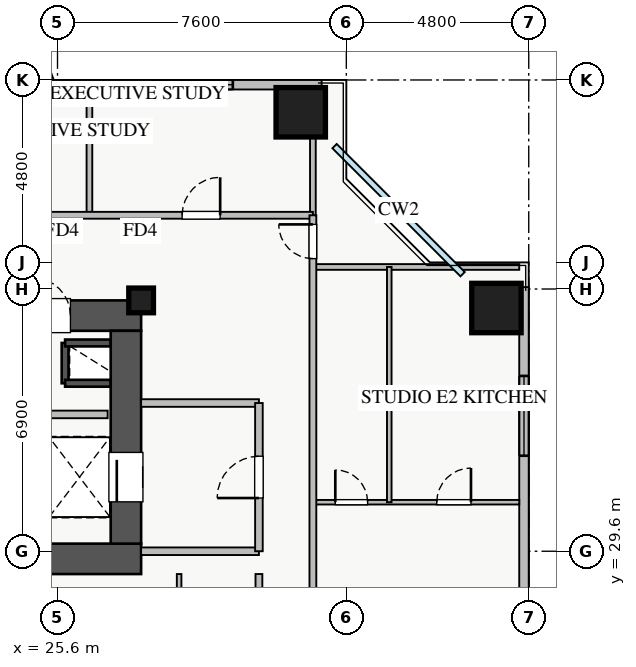
"""IFC4 building model, lengths in metres.
Left out: names, types, materials, properties, quantities, classifications, styles, units other than length and angle.
Written with IfcOpenShell. Run it as: python <this file> out.ifc"""

import sys

from ifc_helpers import new_model, si_unit, direction, frame, frame_2d, origin, origin_2d, place, context, subcontext, project, spatial, rectangle, extrude, source, transform, mapped, element, fill, save


model = new_model("IFC4")
c1 = context("Model", 3, precision=1e-05, world=origin(), true_north=direction((0.0, 1.0)))
c2 = subcontext(c1, "Body", "Model", "MODEL_VIEW")
j1 = project(units=[si_unit("LENGTHUNIT", "METRE"), si_unit("PLANEANGLEUNIT", "RADIAN")], contexts=[c1])
p1 = place(None, origin())
s1 = spatial("IfcSite", under=j1, at=p1, CompositionType="ELEMENT")
p2 = place(p1, origin())
s2 = spatial("IfcBuilding", under=s1, at=p2, CompositionType="ELEMENT")
p3 = place(p2, frame((0.0, 0.0, 73.0)))
s3 = spatial("IfcBuildingStorey", under=s2, at=p3, CompositionType="ELEMENT", Elevation=73.0)
p4 = place(p3, frame((25.8, 34.02, 0.0), z_axis=(0.0, 0.0, 1.0), x_axis=(0.0, 1.0, 0.0)))
e1 = element("IfcWall", 1, at=p4, inside=s3, PredefinedType="SHEAR", context=c2, shape_type="SweptSolid", body=[
    extrude(rectangle(XDim=1.06, YDim=0.18, at=frame_2d((0.53, 0.0))), origin(), (0.0, 0.0, 1.0), 3.07),
])
for number, where, z_axis, x_axis in (
    (2, (25.8, 35.08, 0.0), (0.0, 0.0, 1.0), (1.0, 0.0, 0.0)),
    (3, (25.8, 34.02, 0.0), (0.0, 0.0, 1.0), (1.0, 0.0, 0.0)),
):
    element("IfcWall", number, at=place(p3, frame(where, z_axis=z_axis, x_axis=x_axis)), inside=s3, PredefinedType="SHEAR", context=c2, shape_type="SweptSolid", body=[
        extrude(rectangle(XDim=1.2, YDim=0.18, at=frame_2d((0.6, 0.0))), origin(), (0.0, 0.0, 1.0), 3.07),
    ])
p5 = place(p3, frame((10.2, 29.4, 0.0), z_axis=(0.0, 0.0, 1.0), x_axis=(1.0, 0.0, 0.0)))
e4 = element("IfcWall", 4, at=p5, inside=s3, PredefinedType="SHEAR", context=c2, shape_type="SweptSolid", body=[
    extrude(rectangle(XDim=17.6, YDim=0.8, at=frame_2d((8.8, 0.0))), origin(), (0.0, 0.0, 1.0), 3.25),
])
p6 = place(p3, frame((10.2, 35.8, 0.0), z_axis=(0.0, 0.0, 1.0), x_axis=(1.0, 0.0, 0.0)))
e5 = element("IfcWall", 5, at=p6, inside=s3, PredefinedType="SHEAR", context=c2, shape_type="SweptSolid", body=[
    extrude(rectangle(XDim=17.6, YDim=0.8, at=frame_2d((8.8, 0.0))), origin(), (0.0, 0.0, 1.0), 3.25),
])
p7 = place(p6, frame((1.15, 0.0, 0.0)))
e6 = element("IfcOpeningElement", 6, at=p7, cuts=e5, PredefinedType="OPENING", context=c2, shape_type="SweptSolid", body=[
    extrude(rectangle(XDim=1.1, YDim=2.05, at=frame_2d((0.55, 1.025))), frame((0.0, 0.41, 0.0), z_axis=(0.0, -1.0, 0.0), x_axis=(1.0, 0.0, 0.0)), (0.0, 0.0, 1.0), 0.82),
])
p8 = place(p6, frame((8.3, 0.0, 0.0)))
e7 = element("IfcOpeningElement", 7, at=p8, cuts=e5, PredefinedType="OPENING", context=c2, shape_type="SweptSolid", body=[
    extrude(rectangle(XDim=1.1, YDim=2.05, at=frame_2d((0.55, 1.025))), frame((0.0, 0.41, 0.0), z_axis=(0.0, -1.0, 0.0), x_axis=(1.0, 0.0, 0.0)), (0.0, 0.0, 1.0), 0.82),
])
p9 = place(p6, frame((10.05, 0.0, 0.0)))
e8 = element("IfcOpeningElement", 8, at=p9, cuts=e5, PredefinedType="OPENING", context=c2, shape_type="SweptSolid", body=[
    extrude(rectangle(XDim=1.1, YDim=2.05, at=frame_2d((0.55, 1.025))), frame((0.0, 0.41, 0.0), z_axis=(0.0, -1.0, 0.0), x_axis=(1.0, 0.0, 0.0)), (0.0, 0.0, 1.0), 0.82),
])
p10 = place(p6, frame((14.74, 0.0, 0.0)))
e9 = element("IfcOpeningElement", 9, at=p10, cuts=e5, PredefinedType="OPENING", context=c2, shape_type="SweptSolid", body=[
    extrude(rectangle(XDim=1.0, YDim=2.05, at=frame_2d((0.5, 1.025))), frame((0.0, 0.41, 0.0), z_axis=(0.0, -1.0, 0.0), x_axis=(1.0, 0.0, 0.0)), (0.0, 0.0, 1.0), 0.82),
])
p11 = place(p6, frame((11.95, 0.0, 0.0)))
e10 = element("IfcOpeningElement", 10, at=p11, cuts=e5, PredefinedType="OPENING", context=c2, shape_type="SweptSolid", body=[
    extrude(rectangle(XDim=1.0, YDim=2.05, at=frame_2d((0.5, 1.025))), frame((0.0, 0.41, 0.0), z_axis=(0.0, -1.0, 0.0), x_axis=(1.0, 0.0, 0.0)), (0.0, 0.0, 1.0), 0.82),
])
p12 = place(p6, frame((13.485, 0.0, 0.0)))
e11 = element("IfcOpeningElement", 11, at=p12, cuts=e5, PredefinedType="OPENING", context=c2, shape_type="SweptSolid", body=[
    extrude(rectangle(XDim=1.0, YDim=2.05, at=frame_2d((0.5, 1.025))), frame((0.0, 0.41, 0.0), z_axis=(0.0, -1.0, 0.0), x_axis=(1.0, 0.0, 0.0)), (0.0, 0.0, 1.0), 0.82),
])
p13 = place(p3, frame((27.4, 29.8, 0.0), z_axis=(0.0, 0.0, 1.0), x_axis=(0.0, 1.0, 0.0)))
e12 = element("IfcWall", 12, at=p13, inside=s3, PredefinedType="SHEAR", context=c2, shape_type="SweptSolid", body=[
    extrude(rectangle(XDim=5.6, YDim=0.8, at=frame_2d((2.8, 0.0))), origin(), (0.0, 0.0, 1.0), 3.25),
])
p14 = place(p13, frame((1.1, 0.0, 0.0)))
e13 = element("IfcOpeningElement", 13, at=p14, cuts=e12, PredefinedType="OPENING", context=c2, shape_type="SweptSolid", body=[
    extrude(rectangle(XDim=1.3, YDim=2.05, at=frame_2d((0.65, 1.025))), frame((0.0, 0.41, 0.0), z_axis=(0.0, -1.0, 0.0), x_axis=(1.0, 0.0, 0.0)), (0.0, 0.0, 1.0), 0.82),
])
m1 = source(origin(), c2, "Body", "SweptSolid", [
    extrude(rectangle(XDim=0.65, YDim=0.65, at=origin_2d()), origin(), (0.0, 0.0, 1.0), 3.25),
])
p15 = place(p3, frame((27.8, 36.2, 0.0), z_axis=(0.0, 0.0, 1.0), x_axis=(1.0, 0.0, 0.0)))
e14 = element("IfcColumn", 14, at=p15, inside=s3, PredefinedType="PILASTER", context=c2, shape_type="MappedRepresentation", body=[
    mapped(m1, transform((0.0, 0.0, 0.0), x_axis=(1.0, 0.0, 0.0), y_axis=(0.0, 1.0, 0.0), z_axis=(0.0, 0.0, 1.0), scale=1.0)),
])
m2 = source(origin(), c2, "Body", "SweptSolid", [
    extrude(rectangle(XDim=1.3, YDim=1.3, at=origin_2d()), origin(), (0.0, 0.0, 1.0), 3.25),
])
for number, where, z_axis, x_axis in (
    (15, (37.15, 36.0, 0.0), (0.0, 0.0, 1.0), (1.0, 0.0, 0.0)),
    (16, (32.0, 41.15, 0.0), (0.0, 0.0, 1.0), (1.0, 0.0, 0.0)),
):
    element("IfcColumn", number, at=place(p3, frame(where, z_axis=z_axis, x_axis=x_axis)), inside=s3, PredefinedType="COLUMN", context=c2, shape_type="MappedRepresentation", body=[
        mapped(m2, transform((0.0, 0.0, 0.0), x_axis=(1.0, 0.0, 0.0), y_axis=(0.0, 1.0, 0.0), z_axis=(0.0, 0.0, 1.0), scale=1.0)),
    ])
p16 = place(p3, frame((5.45, 41.875, 0.0), z_axis=(0.0, 0.0, 1.0), x_axis=(1.0, 0.0, 0.0)))
e17 = element("IfcWall", 17, at=p16, inside=s3, PredefinedType="STANDARD", context=c2, shape_type="SweptSolid", body=[
    extrude(rectangle(XDim=27.1, YDim=0.25, at=frame_2d((13.55, 0.0))), origin(), (0.0, 0.0, 1.0), 2.61),
])
p17 = place(p16, frame((14.4, 0.0, 0.0)))
e18 = element("IfcOpeningElement", 18, at=p17, cuts=e17, PredefinedType="OPENING", context=c2, shape_type="SweptSolid", body=[
    extrude(rectangle(XDim=1.2, YDim=2.1, at=frame_2d((0.6, 1.05))), frame((0.0, 0.135, 0.0), z_axis=(0.0, -1.0, 0.0), x_axis=(1.0, 0.0, 0.0)), (0.0, 0.0, 1.0), 0.27),
])
p18 = place(p16, frame((1.48, 0.0, 0.9)))
e19 = element("IfcOpeningElement", 19, at=p18, cuts=e17, PredefinedType="OPENING", context=c2, shape_type="SweptSolid", body=[
    extrude(rectangle(XDim=1.5, YDim=1.5, at=frame_2d((0.75, 0.75))), frame((0.0, 0.135, 0.0), z_axis=(0.0, -1.0, 0.0), x_axis=(1.0, 0.0, 0.0)), (0.0, 0.0, 1.0), 0.27),
])
p19 = place(p16, frame((7.725, 0.0, 0.9)))
e20 = element("IfcOpeningElement", 20, at=p19, cuts=e17, PredefinedType="OPENING", context=c2, shape_type="SweptSolid", body=[
    extrude(rectangle(XDim=1.8, YDim=1.5, at=frame_2d((0.9, 0.75))), frame((0.0, 0.135, 0.0), z_axis=(0.0, -1.0, 0.0), x_axis=(1.0, 0.0, 0.0)), (0.0, 0.0, 1.0), 0.27),
])
p20 = place(p16, frame((17.92, 0.0, 0.9)))
e21 = element("IfcOpeningElement", 21, at=p20, cuts=e17, PredefinedType="OPENING", context=c2, shape_type="SweptSolid", body=[
    extrude(rectangle(XDim=1.5, YDim=1.5, at=frame_2d((0.75, 0.75))), frame((0.0, 0.135, 0.0), z_axis=(0.0, -1.0, 0.0), x_axis=(1.0, 0.0, 0.0)), (0.0, 0.0, 1.0), 0.27),
])
p21 = place(p16, frame((22.663, 0.0, 0.9)))
e22 = element("IfcOpeningElement", 22, at=p21, cuts=e17, PredefinedType="OPENING", context=c2, shape_type="SweptSolid", body=[
    extrude(rectangle(XDim=2.1, YDim=1.48, at=frame_2d((1.05, 0.74))), frame((0.0, 0.135, 0.0), z_axis=(0.0, -1.0, 0.0), x_axis=(1.0, 0.0, 0.0)), (0.0, 0.0, 1.0), 0.27),
])
p22 = place(p16, frame((5.114, 0.0, 0.9)))
e23 = element("IfcOpeningElement", 23, at=p22, cuts=e17, PredefinedType="OPENING", context=c2, shape_type="SweptSolid", body=[
    extrude(rectangle(XDim=2.4, YDim=1.5, at=frame_2d((1.2, 0.75))), frame((0.0, 0.135, 0.0), z_axis=(0.0, -1.0, 0.0), x_axis=(1.0, 0.0, 0.0)), (0.0, 0.0, 1.0), 0.27),
])
p23 = place(p16, frame((10.893, 0.0, 0.9)))
e24 = element("IfcOpeningElement", 24, at=p23, cuts=e17, PredefinedType="OPENING", context=c2, shape_type="SweptSolid", body=[
    extrude(rectangle(XDim=2.4, YDim=1.5, at=frame_2d((1.2, 0.75))), frame((0.0, 0.135, 0.0), z_axis=(0.0, -1.0, 0.0), x_axis=(1.0, 0.0, 0.0)), (0.0, 0.0, 1.0), 0.27),
])
p24 = place(p3, frame((37.875, 9.45, 0.0), z_axis=(0.0, 0.0, 1.0), x_axis=(0.0, 1.0, 0.0)))
e25 = element("IfcWall", 25, at=p24, inside=s3, PredefinedType="STANDARD", context=c2, shape_type="SweptSolid", body=[
    extrude(rectangle(XDim=27.1, YDim=0.25, at=frame_2d((13.55, 0.0))), origin(), (0.0, 0.0, 1.0), 2.61),
])
p25 = place(p24, frame((14.4, 0.0, 0.0)))
e26 = element("IfcOpeningElement", 26, at=p25, cuts=e25, PredefinedType="OPENING", context=c2, shape_type="SweptSolid", body=[
    extrude(rectangle(XDim=1.2, YDim=2.1, at=frame_2d((0.6, 1.05))), frame((0.0, 0.135, 0.0), z_axis=(0.0, -1.0, 0.0), x_axis=(1.0, 0.0, 0.0)), (0.0, 0.0, 1.0), 0.27),
])
p26 = place(p24, frame((2.188, 0.0, 0.9)))
e27 = element("IfcOpeningElement", 27, at=p26, cuts=e25, PredefinedType="OPENING", context=c2, shape_type="SweptSolid", body=[
    extrude(rectangle(XDim=2.4, YDim=1.48, at=frame_2d((1.2, 0.74))), frame((0.0, 0.135, 0.0), z_axis=(0.0, -1.0, 0.0), x_axis=(1.0, 0.0, 0.0)), (0.0, 0.0, 1.0), 0.27),
])
p27 = place(p24, frame((22.663, 0.0, 0.9)))
e28 = element("IfcOpeningElement", 28, at=p27, cuts=e25, PredefinedType="OPENING", context=c2, shape_type="SweptSolid", body=[
    extrude(rectangle(XDim=2.1, YDim=1.48, at=frame_2d((1.05, 0.74))), frame((0.0, 0.135, 0.0), z_axis=(0.0, -1.0, 0.0), x_axis=(1.0, 0.0, 0.0)), (0.0, 0.0, 1.0), 0.27),
])
p28 = place(p24, frame((17.365, 0.0, 0.9)))
e29 = element("IfcOpeningElement", 29, at=p28, cuts=e25, PredefinedType="OPENING", context=c2, shape_type="SweptSolid", body=[
    extrude(rectangle(XDim=0.9, YDim=1.2, at=frame_2d((0.45, 0.6))), frame((0.0, 0.135, 0.0), z_axis=(0.0, -1.0, 0.0), x_axis=(1.0, 0.0, 0.0)), (0.0, 0.0, 1.0), 0.27),
])
for number, where, z_axis, x_axis in (
    (30, (27.8, 29.6, 0.0), (0.0, 0.0, 1.0), (1.0, 0.0, 0.0)),
    (31, (27.8, 33.5, 0.0), (0.0, 0.0, 1.0), (1.0, 0.0, 0.0)),
):
    element("IfcWall", number, at=place(p3, frame(where, z_axis=z_axis, x_axis=x_axis)), inside=s3, PredefinedType="PARTITIONING", context=c2, shape_type="SweptSolid", body=[
        extrude(rectangle(XDim=3.1, YDim=0.2, at=frame_2d((1.55, 0.0))), origin(), (0.0, 0.0, 1.0), 3.07),
    ])
p29 = place(p3, frame((30.9, 29.6, 0.0), z_axis=(0.0, 0.0, 1.0), x_axis=(0.0, 1.0, 0.0)))
e32 = element("IfcWall", 32, at=p29, inside=s3, PredefinedType="PARTITIONING", context=c2, shape_type="SweptSolid", body=[
    extrude(rectangle(XDim=3.9, YDim=0.2, at=frame_2d((1.95, 0.0))), origin(), (0.0, 0.0, 1.0), 3.07),
])
p30 = place(p29, frame((1.4, 0.0, 0.0)))
e33 = element("IfcOpeningElement", 33, at=p30, cuts=e32, PredefinedType="OPENING", context=c2, shape_type="SweptSolid", body=[
    extrude(rectangle(XDim=1.1, YDim=2.05, at=frame_2d((0.55, 1.025))), frame((0.0, 0.11, 0.0), z_axis=(0.0, -1.0, 0.0), x_axis=(1.0, 0.0, 0.0)), (0.0, 0.0, 1.0), 0.22),
])
p31 = place(p3, frame((21.75, 33.2, 0.0), z_axis=(0.0, 0.0, 1.0), x_axis=(1.0, 0.0, 0.0)))
e34 = element("IfcWall", 34, at=p31, inside=s3, PredefinedType="PARTITIONING", context=c2, shape_type="SweptSolid", body=[
    extrude(rectangle(XDim=5.17, YDim=0.2, at=frame_2d((2.585, 0.0))), origin(), (0.0, 0.0, 1.0), 3.07),
])
for number, where, z_axis, x_axis in (
    (35, (26.44, 38.44, 0.0), (0.0, 0.0, 1.0), (0.0, 1.0, 0.0)),
    (36, (32.32, 38.44, 0.0), (0.0, 0.0, 1.0), (0.0, 1.0, 0.0)),
):
    element("IfcWall", number, at=place(p3, frame(where, z_axis=z_axis, x_axis=x_axis)), inside=s3, PredefinedType="PARTITIONING", context=c2, shape_type="SweptSolid", body=[
        extrude(rectangle(XDim=3.31, YDim=0.15, at=frame_2d((1.655, 0.0))), origin(), (0.0, 0.0, 1.0), 3.07),
    ])
p32 = place(p3, frame((8.78, 38.44, 0.0), z_axis=(0.0, 0.0, 1.0), x_axis=(1.0, 0.0, 0.0)))
e37 = element("IfcWall", 37, at=p32, inside=s3, PredefinedType="PARTITIONING", context=c2, shape_type="SweptSolid", body=[
    extrude(rectangle(XDim=23.54, YDim=0.18, at=frame_2d((11.77, 0.0))), origin(), (0.0, 0.0, 1.0), 3.07),
])
p33 = place(p32, frame((2.72, 0.0, 0.0)))
e38 = element("IfcOpeningElement", 38, at=p33, cuts=e37, PredefinedType="OPENING", context=c2, shape_type="SweptSolid", body=[
    extrude(rectangle(XDim=1.0, YDim=2.05, at=frame_2d((0.5, 1.025))), frame((0.0, 0.1, 0.0), z_axis=(0.0, -1.0, 0.0), x_axis=(1.0, 0.0, 0.0)), (0.0, 0.0, 1.0), 0.2),
])
p34 = place(p32, frame((9.23, 0.0, 0.0)))
e39 = element("IfcOpeningElement", 39, at=p34, cuts=e37, PredefinedType="OPENING", context=c2, shape_type="SweptSolid", body=[
    extrude(rectangle(XDim=1.0, YDim=2.05, at=frame_2d((0.5, 1.025))), frame((0.0, 0.1, 0.0), z_axis=(0.0, -1.0, 0.0), x_axis=(1.0, 0.0, 0.0)), (0.0, 0.0, 1.0), 0.2),
])
p35 = place(p32, frame((14.84, 0.0, 0.0)))
e40 = element("IfcOpeningElement", 40, at=p35, cuts=e37, PredefinedType="OPENING", context=c2, shape_type="SweptSolid", body=[
    extrude(rectangle(XDim=1.0, YDim=2.05, at=frame_2d((0.5, 1.025))), frame((0.0, 0.1, 0.0), z_axis=(0.0, -1.0, 0.0), x_axis=(1.0, 0.0, 0.0)), (0.0, 0.0, 1.0), 0.2),
])
p36 = place(p32, frame((20.1, 0.0, 0.0)))
e41 = element("IfcOpeningElement", 41, at=p36, cuts=e37, PredefinedType="OPENING", context=c2, shape_type="SweptSolid", body=[
    extrude(rectangle(XDim=1.0, YDim=2.05, at=frame_2d((0.5, 1.025))), frame((0.0, 0.1, 0.0), z_axis=(0.0, -1.0, 0.0), x_axis=(1.0, 0.0, 0.0)), (0.0, 0.0, 1.0), 0.2),
])
p37 = place(p3, frame((32.32, 37.08, 0.0), z_axis=(0.0, 0.0, 1.0), x_axis=(1.0, 0.0, 0.0)))
e42 = element("IfcWall", 42, at=p37, inside=s3, PredefinedType="PARTITIONING", context=c2, shape_type="SweptSolid", body=[
    extrude(rectangle(XDim=5.43, YDim=0.15, at=frame_2d((2.715, 0.0))), origin(), (0.0, 0.0, 1.0), 3.07),
])
p38 = place(p3, frame((32.32, 30.89, 0.0), z_axis=(0.0, 0.0, 1.0), x_axis=(1.0, 0.0, 0.0)))
e43 = element("IfcWall", 43, at=p38, inside=s3, PredefinedType="PLUMBINGWALL", context=c2, shape_type="SweptSolid", body=[
    extrude(rectangle(XDim=5.43, YDim=0.12, at=frame_2d((2.715, 0.0))), origin(), (0.0, 0.0, 1.0), 3.07),
])
p39 = place(p38, frame((0.59, 0.0, 0.0)))
e44 = element("IfcOpeningElement", 44, at=p39, cuts=e43, PredefinedType="OPENING", context=c2, shape_type="SweptSolid", body=[
    extrude(rectangle(XDim=0.85, YDim=2.05, at=frame_2d((0.425, 1.025))), frame((0.0, 0.07, 0.0), z_axis=(0.0, -1.0, 0.0), x_axis=(1.0, 0.0, 0.0)), (0.0, 0.0, 1.0), 0.14),
])
p40 = place(p38, frame((3.26, 0.0, 0.0)))
e45 = element("IfcOpeningElement", 45, at=p40, cuts=e43, PredefinedType="OPENING", context=c2, shape_type="SweptSolid", body=[
    extrude(rectangle(XDim=0.9, YDim=2.05, at=frame_2d((0.45, 1.025))), frame((0.0, 0.07, 0.0), z_axis=(0.0, -1.0, 0.0), x_axis=(1.0, 0.0, 0.0)), (0.0, 0.0, 1.0), 0.14),
])
p41 = place(p3, frame((34.33, 30.89, 0.0), z_axis=(0.0, 0.0, 1.0), x_axis=(0.0, 1.0, 0.0)))
e46 = element("IfcWall", 46, at=p41, inside=s3, PredefinedType="PLUMBINGWALL", context=c2, shape_type="SweptSolid", body=[
    extrude(rectangle(XDim=6.19, YDim=0.12, at=frame_2d((3.095, 0.0))), origin(), (0.0, 0.0, 1.0), 3.07),
])
p42 = place(p3, frame((32.32, 7.21, 0.0), z_axis=(0.0, 0.0, 1.0), x_axis=(0.0, 1.0, 0.0)))
e47 = element("IfcWall", 47, at=p42, inside=s3, PredefinedType="PARTITIONING", context=c2, shape_type="SweptSolid", body=[
    extrude(rectangle(XDim=31.23, YDim=0.18, at=frame_2d((15.615, 0.0))), origin(), (0.0, 0.0, 1.0), 2.771),
])
p43 = place(p42, frame((30.09, 0.0, 0.0)))
e48 = element("IfcOpeningElement", 48, at=p43, cuts=e47, PredefinedType="OPENING", context=c2, shape_type="SweptSolid", body=[
    extrude(rectangle(XDim=0.9, YDim=2.05, at=frame_2d((0.45, 1.025))), frame((0.0, 0.1, 0.0), z_axis=(0.0, -1.0, 0.0), x_axis=(1.0, 0.0, 0.0)), (0.0, 0.0, 1.0), 0.2),
])
p44 = place(p42, frame((0.415, 0.0, 0.0)))
e49 = element("IfcOpeningElement", 49, at=p44, cuts=e47, PredefinedType="OPENING", context=c2, shape_type="SweptSolid", body=[
    extrude(rectangle(XDim=0.9, YDim=2.05, at=frame_2d((0.45, 1.025))), frame((0.0, 0.1, 0.0), z_axis=(0.0, -1.0, 0.0), x_axis=(1.0, 0.0, 0.0)), (0.0, 0.0, 1.0), 0.2),
])
p45 = place(p42, frame((4.99, 0.0, 0.0)))
e50 = element("IfcOpeningElement", 50, at=p45, cuts=e47, PredefinedType="OPENING", context=c2, shape_type="SweptSolid", body=[
    extrude(rectangle(XDim=1.0, YDim=2.05, at=frame_2d((0.5, 1.025))), frame((0.0, 0.1, 0.0), z_axis=(0.0, -1.0, 0.0), x_axis=(1.0, 0.0, 0.0)), (0.0, 0.0, 1.0), 0.2),
])
p46 = place(p42, frame((19.355, 0.0, 0.0)))
e51 = element("IfcOpeningElement", 51, at=p46, cuts=e47, PredefinedType="OPENING", context=c2, shape_type="SweptSolid", body=[
    extrude(rectangle(XDim=1.0, YDim=2.05, at=frame_2d((0.5, 1.025))), frame((0.0, 0.1, 0.0), z_axis=(0.0, -1.0, 0.0), x_axis=(1.0, 0.0, 0.0)), (0.0, 0.0, 1.0), 0.2),
])
p47 = place(p3, frame((28.8, 23.1, 0.0), z_axis=(0.0, 0.0, 1.0), x_axis=(0.0, 1.0, 0.0)))
e52 = element("IfcWall", 52, at=p47, inside=s3, PredefinedType="PLUMBINGWALL", context=c2, shape_type="SweptSolid", body=[
    extrude(rectangle(XDim=5.9, YDim=0.12, at=frame_2d((2.95, 0.0))), origin(), (0.0, 0.0, 1.0), 3.07),
])
p48 = place(p3, frame((30.9, 17.0, 0.0), z_axis=(0.0, 0.0, 1.0), x_axis=(0.0, 1.0, 0.0)))
e53 = element("IfcWall", 53, at=p48, inside=s3, PredefinedType="PARTITIONING", context=c2, shape_type="SweptSolid", body=[
    extrude(rectangle(XDim=12.0, YDim=0.18, at=frame_2d((6.0, 0.0))), origin(), (0.0, 0.0, 1.0), 3.07),
])
p49 = place(p48, frame((2.36, 0.0, 0.0)))
e54 = element("IfcOpeningElement", 54, at=p49, cuts=e53, PredefinedType="OPENING", context=c2, shape_type="SweptSolid", body=[
    extrude(rectangle(XDim=1.0, YDim=2.05, at=frame_2d((0.5, 1.025))), frame((0.0, 0.1, 0.0), z_axis=(0.0, -1.0, 0.0), x_axis=(1.0, 0.0, 0.0)), (0.0, 0.0, 1.0), 0.2),
])
m3 = source(origin(), c2, "Body", "SweptSolid", [
    extrude(rectangle(XDim=2.1, YDim=1.48, at=frame_2d((1.05, 0.74))), frame((0.0, 0.03, 0.0), z_axis=(0.0, -1.0, 0.0), x_axis=(1.0, 0.0, 0.0)), (0.0, 0.0, 1.0), 0.06),
])
p50 = place(p21, origin())
e55 = element("IfcWindow", 55, at=p50, inside=s3, PartitioningType="TRIPLE_PANEL_VERTICAL", PredefinedType="WINDOW", context=c2, shape_type="MappedRepresentation", body=[
    mapped(m3, transform((0.0, 0.0, 0.0), x_axis=(1.0, 0.0, 0.0), y_axis=(0.0, 1.0, 0.0), z_axis=(0.0, 0.0, 1.0), scale=1.0)),
])
fill(e22, e55)
p51 = place(p27, origin())
e56 = element("IfcWindow", 56, at=p51, inside=s3, PartitioningType="TRIPLE_PANEL_VERTICAL", PredefinedType="WINDOW", context=c2, shape_type="MappedRepresentation", body=[
    mapped(m3, transform((0.0, 0.0, 0.0), x_axis=(1.0, 0.0, 0.0), y_axis=(0.0, 1.0, 0.0), z_axis=(0.0, 0.0, 1.0), scale=1.0)),
])
fill(e28, e56)
m4 = source(origin(), c2, "Body", "SweptSolid", [
    extrude(rectangle(XDim=1.3, YDim=2.05, at=frame_2d((0.65, 1.025))), frame((0.0, 0.025, 0.0), z_axis=(0.0, -1.0, 0.0), x_axis=(1.0, 0.0, 0.0)), (0.0, 0.0, 1.0), 0.05),
])
p52 = place(p14, origin())
e57 = element("IfcDoor", 57, at=p52, inside=s3, OperationType="SLIDING_TO_LEFT", PredefinedType="DOOR", context=c2, shape_type="MappedRepresentation", body=[
    mapped(m4, transform((0.0, 0.0, 0.0), x_axis=(1.0, 0.0, 0.0), y_axis=(0.0, 1.0, 0.0), z_axis=(0.0, 0.0, 1.0), scale=1.0)),
])
fill(e13, e57)
m5 = source(origin(), c2, "Body", "SweptSolid", [
    extrude(rectangle(XDim=1.0, YDim=2.05, at=frame_2d((0.5, 1.025))), frame((0.0, 0.025, 0.0), z_axis=(0.0, -1.0, 0.0), x_axis=(1.0, 0.0, 0.0)), (0.0, 0.0, 1.0), 0.05),
])
p53 = place(p10, origin())
e58 = element("IfcDoor", 58, at=p53, inside=s3, OperationType="SINGLE_SWING_LEFT", PredefinedType="DOOR", context=c2, shape_type="MappedRepresentation", body=[
    mapped(m5, transform((0.0, 0.0, 0.0), x_axis=(1.0, 0.0, 0.0), y_axis=(0.0, 1.0, 0.0), z_axis=(0.0, 0.0, 1.0), scale=1.0)),
])
fill(e9, e58)
m6 = source(origin(), c2, "Body", "SweptSolid", [
    extrude(rectangle(XDim=1.1, YDim=2.05, at=frame_2d((0.55, 1.025))), frame((0.0, 0.025, 0.0), z_axis=(0.0, -1.0, 0.0), x_axis=(1.0, 0.0, 0.0)), (0.0, 0.0, 1.0), 0.05),
])
p54 = place(p30, origin())
e59 = element("IfcDoor", 59, at=p54, inside=s3, OperationType="SINGLE_SWING_LEFT", PredefinedType="DOOR", context=c2, shape_type="MappedRepresentation", body=[
    mapped(m6, transform((0.0, 0.0, 0.0), x_axis=(1.0, 0.0, 0.0), y_axis=(0.0, 1.0, 0.0), z_axis=(0.0, 0.0, 1.0), scale=1.0)),
])
fill(e33, e59)
p55 = place(p36, origin())
e60 = element("IfcDoor", 60, at=p55, inside=s3, OperationType="SINGLE_SWING_RIGHT", PredefinedType="DOOR", context=c2, shape_type="MappedRepresentation", body=[
    mapped(m5, transform((0.0, 0.0, 0.0), x_axis=(1.0, 0.0, 0.0), y_axis=(0.0, 1.0, 0.0), z_axis=(0.0, 0.0, 1.0), scale=1.0)),
])
fill(e41, e60)
m7 = source(origin(), c2, "Body", "SweptSolid", [
    extrude(rectangle(XDim=0.85, YDim=2.05, at=frame_2d((0.425, 1.025))), frame((0.0, 0.025, 0.0), z_axis=(0.0, -1.0, 0.0), x_axis=(1.0, 0.0, 0.0)), (0.0, 0.0, 1.0), 0.05),
])
p56 = place(p39, origin())
e61 = element("IfcDoor", 61, at=p56, inside=s3, OperationType="SINGLE_SWING_LEFT", PredefinedType="DOOR", context=c2, shape_type="MappedRepresentation", body=[
    mapped(m7, transform((0.0, 0.0, 0.0), x_axis=(1.0, 0.0, 0.0), y_axis=(0.0, 1.0, 0.0), z_axis=(0.0, 0.0, 1.0), scale=1.0)),
])
fill(e44, e61)
m8 = source(origin(), c2, "Body", "SweptSolid", [
    extrude(rectangle(XDim=0.9, YDim=2.05, at=frame_2d((0.45, 1.025))), frame((0.0, 0.025, 0.0), z_axis=(0.0, -1.0, 0.0), x_axis=(1.0, 0.0, 0.0)), (0.0, 0.0, 1.0), 0.05),
])
p57 = place(p40, origin())
e62 = element("IfcDoor", 62, at=p57, inside=s3, OperationType="SINGLE_SWING_RIGHT", PredefinedType="DOOR", context=c2, shape_type="MappedRepresentation", body=[
    mapped(m8, transform((0.0, 0.0, 0.0), x_axis=(1.0, 0.0, 0.0), y_axis=(0.0, 1.0, 0.0), z_axis=(0.0, 0.0, 1.0), scale=1.0)),
])
fill(e45, e62)
p58 = place(p43, origin())
e63 = element("IfcDoor", 63, at=p58, inside=s3, OperationType="SINGLE_SWING_RIGHT", PredefinedType="DOOR", context=c2, shape_type="MappedRepresentation", body=[
    mapped(m8, transform((0.0, 0.0, 0.0), x_axis=(1.0, 0.0, 0.0), y_axis=(0.0, 1.0, 0.0), z_axis=(0.0, 0.0, 1.0), scale=1.0)),
])
fill(e48, e63)
save(model, sys.argv[1])
